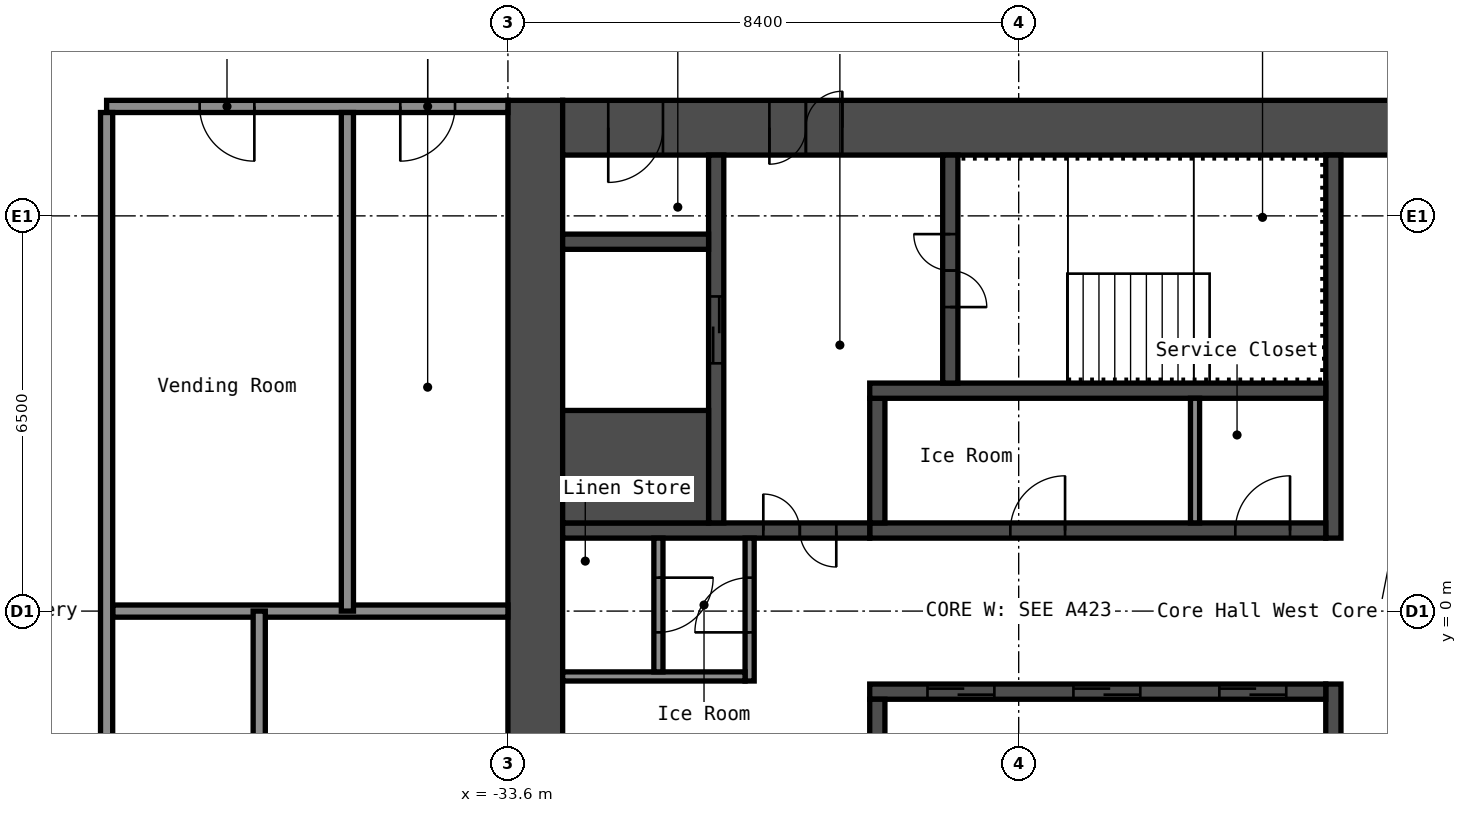
"""IFC4 building model, lengths in metres.
Left out: names, types, materials, properties, quantities, classifications, styles, units other than length and angle.
Written with IfcOpenShell. Run it as: python <this file> out.ifc"""

import sys

from ifc_helpers import new_model, si_unit, direction, frame, frame_2d, origin, place, context, subcontext, project, spatial, rectangle, extrude, element, fill, save


model = new_model("IFC4")
c1 = context("Model", 3, precision=1e-05, world=origin(), true_north=direction((0.0, 1.0)))
c2 = subcontext(c1, "Body", "Model", "MODEL_VIEW")
j1 = project(units=[si_unit("LENGTHUNIT", "METRE"), si_unit("PLANEANGLEUNIT", "RADIAN")], contexts=[c1])
p1 = place(None, origin())
s1 = spatial("IfcSite", under=j1, at=p1, CompositionType="ELEMENT")
p2 = place(p1, origin())
s2 = spatial("IfcBuilding", under=s1, at=p2, CompositionType="ELEMENT")
p3 = place(p2, frame((0.0, 0.0, 159.8)))
s3 = spatial("IfcBuildingStorey", under=s2, at=p3, CompositionType="ELEMENT", Elevation=159.8)
p4 = place(p3, frame((-33.15, -8.4, 0.0), z_axis=(0.0, 0.0, 1.0), x_axis=(0.0, 1.0, 0.0)))
e1 = element("IfcWall", 1, at=p4, inside=s3, PredefinedType="SHEAR", context=c2, shape_type="SweptSolid", body=[
    extrude(rectangle(XDim=16.8, YDim=0.9, at=frame_2d((8.4, 0.0))), origin(), (0.0, 0.0, 1.0), 2.75),
])
p5 = place(p3, frame((-32.7, 7.95, 0.0), z_axis=(0.0, 0.0, 1.0), x_axis=(1.0, 0.0, 0.0)))
e2 = element("IfcWall", 2, at=p5, inside=s3, PredefinedType="SHEAR", context=c2, shape_type="SweptSolid", body=[
    extrude(rectangle(XDim=15.0, YDim=0.9, at=frame_2d((7.5, 0.0))), origin(), (0.0, 0.0, 1.0), 2.75),
])
p6 = place(p5, frame((3.4, 0.0, 0.0)))
e3 = element("IfcOpeningElement", 3, at=p6, cuts=e2, PredefinedType="OPENING", context=c2, shape_type="SweptSolid", body=[
    extrude(rectangle(XDim=1.2, YDim=2.1, at=frame_2d((0.6, 1.05))), frame((0.0, 0.46, 0.0), z_axis=(0.0, -1.0, 0.0), x_axis=(1.0, 0.0, 0.0)), (0.0, 0.0, 1.0), 0.92),
])
p7 = place(p5, frame((0.75, 0.0, 0.0)))
e4 = element("IfcOpeningElement", 4, at=p7, cuts=e2, PredefinedType="OPENING", context=c2, shape_type="SweptSolid", body=[
    extrude(rectangle(XDim=0.9, YDim=2.1, at=frame_2d((0.45, 1.05))), frame((0.0, 0.46, 0.0), z_axis=(0.0, -1.0, 0.0), x_axis=(1.0, 0.0, 0.0)), (0.0, 0.0, 1.0), 0.92),
])
p8 = place(p3, frame((-20.025, 1.2, 0.0), z_axis=(0.0, 0.0, 1.0), x_axis=(0.0, 1.0, 0.0)))
e5 = element("IfcWall", 5, at=p8, inside=s3, PredefinedType="SHEAR", context=c2, shape_type="SweptSolid", body=[
    extrude(rectangle(XDim=6.3, YDim=0.25, at=frame_2d((3.15, 0.0))), origin(), (0.0, 0.0, 1.0), 2.75),
])
p9 = place(p3, frame((-20.025, -7.5, 0.0), z_axis=(0.0, 0.0, 1.0), x_axis=(0.0, 1.0, 0.0)))
e6 = element("IfcWall", 6, at=p9, inside=s3, PredefinedType="SHEAR", context=c2, shape_type="SweptSolid", body=[
    extrude(rectangle(XDim=6.3, YDim=0.25, at=frame_2d((3.15, 0.0))), origin(), (0.0, 0.0, 1.0), 2.75),
])
p10 = place(p9, frame((2.4, 0.0, 0.0)))
e7 = element("IfcOpeningElement", 7, at=p10, cuts=e6, PredefinedType="OPENING", context=c2, shape_type="SweptSolid", body=[
    extrude(rectangle(XDim=1.0, YDim=2.1, at=frame_2d((0.5, 1.05))), frame((0.0, 0.135, 0.0), z_axis=(0.0, -1.0, 0.0), x_axis=(1.0, 0.0, 0.0)), (0.0, 0.0, 1.0), 0.27),
])
p11 = place(p3, frame((-27.65, 1.325, 0.0), z_axis=(0.0, 0.0, 1.0), x_axis=(1.0, 0.0, 0.0)))
e8 = element("IfcWall", 8, at=p11, inside=s3, PredefinedType="SHEAR", context=c2, shape_type="SweptSolid", body=[
    extrude(rectangle(XDim=7.5, YDim=0.25, at=frame_2d((3.75, 0.0))), origin(), (0.0, 0.0, 1.0), 2.75),
])
p12 = place(p11, frame((6.012, 0.0, 0.0)))
e9 = element("IfcOpeningElement", 9, at=p12, cuts=e8, PredefinedType="OPENING", context=c2, shape_type="SweptSolid", body=[
    extrude(rectangle(XDim=0.9, YDim=2.1, at=frame_2d((0.45, 1.05))), frame((0.0, 0.135, 0.0), z_axis=(0.0, -1.0, 0.0), x_axis=(1.0, 0.0, 0.0)), (0.0, 0.0, 1.0), 0.27),
])
p13 = place(p11, frame((2.312, 0.0, 0.0)))
e10 = element("IfcOpeningElement", 10, at=p13, cuts=e8, PredefinedType="OPENING", context=c2, shape_type="SweptSolid", body=[
    extrude(rectangle(XDim=0.9, YDim=2.1, at=frame_2d((0.45, 1.05))), frame((0.0, 0.135, 0.0), z_axis=(0.0, -1.0, 0.0), x_axis=(1.0, 0.0, 0.0)), (0.0, 0.0, 1.0), 0.27),
])
p14 = place(p3, frame((-27.525, 1.45, 0.0), z_axis=(0.0, 0.0, 1.0), x_axis=(0.0, 1.0, 0.0)))
e11 = element("IfcWall", 11, at=p14, inside=s3, PredefinedType="SHEAR", context=c2, shape_type="SweptSolid", body=[
    extrude(rectangle(XDim=2.05, YDim=0.25, at=frame_2d((1.025, 0.0))), origin(), (0.0, 0.0, 1.0), 2.75),
])
p15 = place(p3, frame((-27.65, 3.625, 0.0), z_axis=(0.0, 0.0, 1.0), x_axis=(1.0, 0.0, 0.0)))
e12 = element("IfcWall", 12, at=p15, inside=s3, PredefinedType="SHEAR", context=c2, shape_type="SweptSolid", body=[
    extrude(rectangle(XDim=7.5, YDim=0.25, at=frame_2d((3.75, 0.0))), origin(), (0.0, 0.0, 1.0), 2.75),
])
p16 = place(p3, frame((-26.325, 3.75, 0.0), z_axis=(0.0, 0.0, 1.0), x_axis=(0.0, 1.0, 0.0)))
e13 = element("IfcWall", 13, at=p16, inside=s3, PredefinedType="SHEAR", context=c2, shape_type="SweptSolid", body=[
    extrude(rectangle(XDim=3.75, YDim=0.25, at=frame_2d((1.875, 0.0))), origin(), (0.0, 0.0, 1.0), 2.75),
])
p17 = place(p16, frame((1.25, 0.0, 0.0)))
e14 = element("IfcOpeningElement", 14, at=p17, cuts=e13, PredefinedType="OPENING", context=c2, shape_type="SweptSolid", body=[
    extrude(rectangle(XDim=1.2, YDim=2.1, at=frame_2d((0.6, 1.05))), frame((0.0, 0.135, 0.0), z_axis=(0.0, -1.0, 0.0), x_axis=(1.0, 0.0, 0.0)), (0.0, 0.0, 1.0), 0.27),
])
p18 = place(p3, frame((-32.7, 1.325, 0.0), z_axis=(0.0, 0.0, 1.0), x_axis=(1.0, 0.0, 0.0)))
e15 = element("IfcWall", 15, at=p18, inside=s3, PredefinedType="SHEAR", context=c2, shape_type="SweptSolid", body=[
    extrude(rectangle(XDim=5.05, YDim=0.25, at=frame_2d((2.525, 0.0))), origin(), (0.0, 0.0, 1.0), 2.75),
])
p19 = place(p18, frame((3.3, 0.0, 0.0)))
e16 = element("IfcOpeningElement", 16, at=p19, cuts=e15, PredefinedType="OPENING", context=c2, shape_type="SweptSolid", body=[
    extrude(rectangle(XDim=1.2, YDim=2.1, at=frame_2d((0.6, 1.05))), frame((0.0, 0.135, 0.0), z_axis=(0.0, -1.0, 0.0), x_axis=(1.0, 0.0, 0.0)), (0.0, 0.0, 1.0), 0.27),
])
p20 = place(p3, frame((-30.175, 1.45, 0.0), z_axis=(0.0, 0.0, 1.0), x_axis=(0.0, 1.0, 0.0)))
e17 = element("IfcWall", 17, at=p20, inside=s3, PredefinedType="SHEAR", context=c2, shape_type="SweptSolid", body=[
    extrude(rectangle(XDim=6.05, YDim=0.25, at=frame_2d((3.025, 0.0))), origin(), (0.0, 0.0, 1.0), 2.75),
])
p21 = place(p20, frame((2.625, 0.0, 0.0)))
e18 = element("IfcOpeningElement", 18, at=p21, cuts=e17, PredefinedType="OPENING", context=c2, shape_type="SweptSolid", body=[
    extrude(rectangle(XDim=1.1, YDim=2.1, at=frame_2d((0.55, 1.05))), frame((0.0, 0.135, 0.0), z_axis=(0.0, -1.0, 0.0), x_axis=(1.0, 0.0, 0.0)), (0.0, 0.0, 1.0), 0.27),
])
p22 = place(p3, frame((-32.7, 2.375, 0.0), z_axis=(0.0, 0.0, 1.0), x_axis=(1.0, 0.0, 0.0)))
e19 = element("IfcWall", 19, at=p22, inside=s3, PredefinedType="SHEAR", context=c2, shape_type="SweptSolid", body=[
    extrude(rectangle(XDim=2.4, YDim=1.85, at=frame_2d((1.2, 0.0))), origin(), (0.0, 0.0, 1.0), 2.75),
])
p23 = place(p3, frame((-32.7, 6.075, 0.0), z_axis=(0.0, 0.0, 1.0), x_axis=(1.0, 0.0, 0.0)))
e20 = element("IfcWall", 20, at=p23, inside=s3, PredefinedType="SHEAR", context=c2, shape_type="SweptSolid", body=[
    extrude(rectangle(XDim=2.4, YDim=0.25, at=frame_2d((1.2, 0.0))), origin(), (0.0, 0.0, 1.0), 2.75),
])
p24 = place(p3, frame((-27.65, -1.325, 0.0), z_axis=(0.0, 0.0, 1.0), x_axis=(1.0, 0.0, 0.0)))
e21 = element("IfcWall", 21, at=p24, inside=s3, PredefinedType="SHEAR", context=c2, shape_type="SweptSolid", body=[
    extrude(rectangle(XDim=7.5, YDim=0.25, at=frame_2d((3.75, 0.0))), origin(), (0.0, 0.0, 1.0), 2.75),
])
p25 = place(p24, frame((5.75, 0.0, 0.0)))
e22 = element("IfcOpeningElement", 22, at=p25, cuts=e21, PredefinedType="OPENING", context=c2, shape_type="SweptSolid", body=[
    extrude(rectangle(XDim=1.1, YDim=2.1, at=frame_2d((0.55, 1.05))), frame((0.0, 0.135, 0.0), z_axis=(0.0, -1.0, 0.0), x_axis=(1.0, 0.0, 0.0)), (0.0, 0.0, 1.0), 0.27),
])
p26 = place(p24, frame((3.35, 0.0, 0.0)))
e23 = element("IfcOpeningElement", 23, at=p26, cuts=e21, PredefinedType="OPENING", context=c2, shape_type="SweptSolid", body=[
    extrude(rectangle(XDim=1.1, YDim=2.1, at=frame_2d((0.55, 1.05))), frame((0.0, 0.135, 0.0), z_axis=(0.0, -1.0, 0.0), x_axis=(1.0, 0.0, 0.0)), (0.0, 0.0, 1.0), 0.27),
])
p27 = place(p24, frame((0.95, 0.0, 0.0)))
e24 = element("IfcOpeningElement", 24, at=p27, cuts=e21, PredefinedType="OPENING", context=c2, shape_type="SweptSolid", body=[
    extrude(rectangle(XDim=1.1, YDim=2.1, at=frame_2d((0.55, 1.05))), frame((0.0, 0.135, 0.0), z_axis=(0.0, -1.0, 0.0), x_axis=(1.0, 0.0, 0.0)), (0.0, 0.0, 1.0), 0.27),
])
p28 = place(p3, frame((-27.525, -3.5, 0.0), z_axis=(0.0, 0.0, 1.0), x_axis=(0.0, 1.0, 0.0)))
e25 = element("IfcWall", 25, at=p28, inside=s3, PredefinedType="SHEAR", context=c2, shape_type="SweptSolid", body=[
    extrude(rectangle(XDim=2.05, YDim=0.25, at=frame_2d((1.025, 0.0))), origin(), (0.0, 0.0, 1.0), 2.75),
])
p29 = place(p3, frame((-29.625, -1.15, 0.0), z_axis=(0.0, 0.0, 1.0), x_axis=(0.0, 1.0, 0.0)))
e26 = element("IfcWall", 26, at=p29, inside=s3, PredefinedType="PARTITIONING", context=c2, shape_type="SweptSolid", body=[
    extrude(rectangle(XDim=2.35, YDim=0.15, at=frame_2d((1.175, 0.0))), origin(), (0.0, 0.0, 1.0), 2.75),
])
p30 = place(p29, frame((0.8, 0.0, 0.0)))
e27 = element("IfcOpeningElement", 27, at=p30, cuts=e26, PredefinedType="OPENING", context=c2, shape_type="SweptSolid", body=[
    extrude(rectangle(XDim=0.9, YDim=2.1, at=frame_2d((0.45, 1.05))), frame((0.0, 0.085, 0.0), z_axis=(0.0, -1.0, 0.0), x_axis=(1.0, 0.0, 0.0)), (0.0, 0.0, 1.0), 0.17),
])
p31 = place(p3, frame((-32.7, -1.075, 0.0), z_axis=(0.0, 0.0, 1.0), x_axis=(1.0, 0.0, 0.0)))
e28 = element("IfcWall", 28, at=p31, inside=s3, PredefinedType="PARTITIONING", context=c2, shape_type="SweptSolid", body=[
    extrude(rectangle(XDim=3.0, YDim=0.15, at=frame_2d((1.5, 0.0))), origin(), (0.0, 0.0, 1.0), 2.75),
])
p32 = place(p3, frame((-31.125, -1.0, 0.0), z_axis=(0.0, 0.0, 1.0), x_axis=(0.0, 1.0, 0.0)))
e29 = element("IfcWall", 29, at=p32, inside=s3, PredefinedType="PARTITIONING", context=c2, shape_type="SweptSolid", body=[
    extrude(rectangle(XDim=2.2, YDim=0.15, at=frame_2d((1.1, 0.0))), origin(), (0.0, 0.0, 1.0), 2.75),
])
p33 = place(p32, frame((0.65, 0.0, 0.0)))
e30 = element("IfcOpeningElement", 30, at=p33, cuts=e29, PredefinedType="OPENING", context=c2, shape_type="SweptSolid", body=[
    extrude(rectangle(XDim=0.9, YDim=2.1, at=frame_2d((0.45, 1.05))), frame((0.0, 0.085, 0.0), z_axis=(0.0, -1.0, 0.0), x_axis=(1.0, 0.0, 0.0)), (0.0, 0.0, 1.0), 0.17),
])
p34 = place(p3, frame((-22.3, 1.45, 0.0), z_axis=(0.0, 0.0, 1.0), x_axis=(0.0, 1.0, 0.0)))
e31 = element("IfcWall", 31, at=p34, inside=s3, PredefinedType="PARTITIONING", context=c2, shape_type="SweptSolid", body=[
    extrude(rectangle(XDim=2.05, YDim=0.15, at=frame_2d((1.025, 0.0))), origin(), (0.0, 0.0, 1.0), 2.75),
])
p35 = place(p3, frame((-40.1, 0.0, 0.0), z_axis=(0.0, 0.0, 1.0), x_axis=(1.0, 0.0, 0.0)))
e32 = element("IfcWall", 32, at=p35, inside=s3, PredefinedType="PARTITIONING", context=c2, shape_type="SweptSolid", body=[
    extrude(rectangle(XDim=6.5, YDim=0.2, at=frame_2d((3.25, 0.0))), origin(), (0.0, 0.0, 1.0), 2.75),
])
p36 = place(p3, frame((-40.2, 8.3, 0.0), z_axis=(0.0, 0.0, 1.0), x_axis=(1.0, 0.0, 0.0)))
e33 = element("IfcWall", 33, at=p36, inside=s3, PredefinedType="PARTITIONING", context=c2, shape_type="SweptSolid", body=[
    extrude(rectangle(XDim=6.6, YDim=0.2, at=frame_2d((3.3, 0.0))), origin(), (0.0, 0.0, 1.0), 2.75),
])
p37 = place(p36, frame((1.53, 0.0, 0.0)))
e34 = element("IfcOpeningElement", 34, at=p37, cuts=e33, PredefinedType="OPENING", context=c2, shape_type="SweptSolid", body=[
    extrude(rectangle(XDim=0.9, YDim=2.1, at=frame_2d((0.45, 1.05))), frame((0.0, 0.11, 0.0), z_axis=(0.0, -1.0, 0.0), x_axis=(1.0, 0.0, 0.0)), (0.0, 0.0, 1.0), 0.22),
])
p38 = place(p36, frame((4.83, 0.0, 0.0)))
e35 = element("IfcOpeningElement", 35, at=p38, cuts=e33, PredefinedType="OPENING", context=c2, shape_type="SweptSolid", body=[
    extrude(rectangle(XDim=0.9, YDim=2.1, at=frame_2d((0.45, 1.05))), frame((0.0, 0.11, 0.0), z_axis=(0.0, -1.0, 0.0), x_axis=(1.0, 0.0, 0.0)), (0.0, 0.0, 1.0), 0.22),
])
p39 = place(p3, frame((-40.2, -8.2, 0.0), z_axis=(0.0, 0.0, 1.0), x_axis=(0.0, 1.0, 0.0)))
e36 = element("IfcWall", 36, at=p39, inside=s3, PredefinedType="PARTITIONING", context=c2, shape_type="SweptSolid", body=[
    extrude(rectangle(XDim=16.4, YDim=0.2, at=frame_2d((8.2, 0.0))), origin(), (0.0, 0.0, 1.0), 2.75),
])
for number, where, z_axis, x_axis in (
    (37, (-37.69, -8.2, 0.0), (0.0, 0.0, 1.0), (0.0, 1.0, 0.0)),
    (38, (-36.24, 0.0, 0.0), (0.0, 0.0, 1.0), (0.0, 1.0, 0.0)),
):
    element("IfcWall", number, at=place(p3, frame(where, z_axis=z_axis, x_axis=x_axis)), inside=s3, PredefinedType="PARTITIONING", context=c2, shape_type="SweptSolid", body=[
        extrude(rectangle(XDim=8.2, YDim=0.2, at=frame_2d((4.1, 0.0))), origin(), (0.0, 0.0, 1.0), 2.75),
    ])
p40 = place(p6, origin())
e39 = element("IfcDoor", 39, at=p40, inside=s3, OperationType="DOUBLE_DOOR_SINGLE_SWING", PredefinedType="DOOR", context=c2, shape_type="SweptSolid", body=[
    extrude(rectangle(XDim=1.2, YDim=2.1, at=frame_2d((0.6, 1.05))), frame((0.0, 0.025, 0.0), z_axis=(0.0, -1.0, 0.0), x_axis=(1.0, 0.0, 0.0)), (0.0, 0.0, 1.0), 0.05),
])
fill(e3, e39)
p41 = place(p7, origin())
e40 = element("IfcDoor", 40, at=p41, inside=s3, OperationType="SINGLE_SWING_LEFT", PredefinedType="DOOR", context=c2, shape_type="SweptSolid", body=[
    extrude(rectangle(XDim=0.9, YDim=2.1, at=frame_2d((0.45, 1.05))), frame((0.0, 0.025, 0.0), z_axis=(0.0, -1.0, 0.0), x_axis=(1.0, 0.0, 0.0)), (0.0, 0.0, 1.0), 0.05),
])
fill(e4, e40)
p42 = place(p17, origin())
e41 = element("IfcDoor", 41, at=p42, inside=s3, OperationType="DOUBLE_DOOR_SINGLE_SWING", PredefinedType="DOOR", context=c2, shape_type="SweptSolid", body=[
    extrude(rectangle(XDim=1.2, YDim=2.1, at=frame_2d((0.6, 1.05))), frame((0.0, 0.025, 0.0), z_axis=(0.0, -1.0, 0.0), x_axis=(1.0, 0.0, 0.0)), (0.0, 0.0, 1.0), 0.05),
])
fill(e14, e41)
p43 = place(p19, origin())
e42 = element("IfcDoor", 42, at=p43, inside=s3, OperationType="DOUBLE_DOOR_SINGLE_SWING", PredefinedType="DOOR", context=c2, shape_type="SweptSolid", body=[
    extrude(rectangle(XDim=1.2, YDim=2.1, at=frame_2d((0.6, 1.05))), frame((0.0, 0.025, 0.0), z_axis=(0.0, -1.0, 0.0), x_axis=(1.0, 0.0, 0.0)), (0.0, 0.0, 1.0), 0.05),
])
fill(e16, e42)
p44 = place(p30, origin())
e43 = element("IfcDoor", 43, at=p44, inside=s3, OperationType="SINGLE_SWING_RIGHT", PredefinedType="DOOR", context=c2, shape_type="SweptSolid", body=[
    extrude(rectangle(XDim=0.9, YDim=2.1, at=frame_2d((0.45, 1.05))), frame((0.0, 0.025, 0.0), z_axis=(0.0, -1.0, 0.0), x_axis=(1.0, 0.0, 0.0)), (0.0, 0.0, 1.0), 0.05),
])
fill(e27, e43)
p45 = place(p33, origin())
e44 = element("IfcDoor", 44, at=p45, inside=s3, OperationType="SINGLE_SWING_RIGHT", PredefinedType="DOOR", context=c2, shape_type="SweptSolid", body=[
    extrude(rectangle(XDim=0.9, YDim=2.1, at=frame_2d((0.45, 1.05))), frame((0.0, 0.025, 0.0), z_axis=(0.0, -1.0, 0.0), x_axis=(1.0, 0.0, 0.0)), (0.0, 0.0, 1.0), 0.05),
])
fill(e30, e44)
p46 = place(p12, origin())
e45 = element("IfcDoor", 45, at=p46, inside=s3, OperationType="SINGLE_SWING_LEFT", PredefinedType="DOOR", context=c2, shape_type="SweptSolid", body=[
    extrude(rectangle(XDim=0.9, YDim=2.1, at=frame_2d((0.45, 1.05))), frame((0.0, 0.025, 0.0), z_axis=(0.0, -1.0, 0.0), x_axis=(1.0, 0.0, 0.0)), (0.0, 0.0, 1.0), 0.05),
])
fill(e9, e45)
p47 = place(p13, origin())
e46 = element("IfcDoor", 46, at=p47, inside=s3, OperationType="SINGLE_SWING_LEFT", PredefinedType="DOOR", context=c2, shape_type="SweptSolid", body=[
    extrude(rectangle(XDim=0.9, YDim=2.1, at=frame_2d((0.45, 1.05))), frame((0.0, 0.025, 0.0), z_axis=(0.0, -1.0, 0.0), x_axis=(1.0, 0.0, 0.0)), (0.0, 0.0, 1.0), 0.05),
])
fill(e10, e46)
p48 = place(p25, origin())
e47 = element("IfcDoor", 47, at=p48, inside=s3, OperationType="DOUBLE_DOOR_SLIDING", PredefinedType="DOOR", context=c2, shape_type="SweptSolid", body=[
    extrude(rectangle(XDim=1.1, YDim=2.1, at=frame_2d((0.55, 1.05))), frame((0.0, 0.025, 0.0), z_axis=(0.0, -1.0, 0.0), x_axis=(1.0, 0.0, 0.0)), (0.0, 0.0, 1.0), 0.05),
])
fill(e22, e47)
p49 = place(p26, origin())
e48 = element("IfcDoor", 48, at=p49, inside=s3, OperationType="DOUBLE_DOOR_SLIDING", PredefinedType="DOOR", context=c2, shape_type="SweptSolid", body=[
    extrude(rectangle(XDim=1.1, YDim=2.1, at=frame_2d((0.55, 1.05))), frame((0.0, 0.025, 0.0), z_axis=(0.0, -1.0, 0.0), x_axis=(1.0, 0.0, 0.0)), (0.0, 0.0, 1.0), 0.05),
])
fill(e23, e48)
p50 = place(p27, origin())
e49 = element("IfcDoor", 49, at=p50, inside=s3, OperationType="DOUBLE_DOOR_SLIDING", PredefinedType="DOOR", context=c2, shape_type="SweptSolid", body=[
    extrude(rectangle(XDim=1.1, YDim=2.1, at=frame_2d((0.55, 1.05))), frame((0.0, 0.025, 0.0), z_axis=(0.0, -1.0, 0.0), x_axis=(1.0, 0.0, 0.0)), (0.0, 0.0, 1.0), 0.05),
])
fill(e24, e49)
p51 = place(p21, origin())
e50 = element("IfcDoor", 50, at=p51, inside=s3, OperationType="DOUBLE_DOOR_SLIDING", PredefinedType="DOOR", context=c2, shape_type="SweptSolid", body=[
    extrude(rectangle(XDim=1.1, YDim=2.1, at=frame_2d((0.55, 1.05))), frame((0.0, 0.025, 0.0), z_axis=(0.0, -1.0, 0.0), x_axis=(1.0, 0.0, 0.0)), (0.0, 0.0, 1.0), 0.05),
])
fill(e18, e50)
p52 = place(p37, origin())
e51 = element("IfcDoor", 51, at=p52, inside=s3, OperationType="SINGLE_SWING_RIGHT", PredefinedType="DOOR", context=c2, shape_type="SweptSolid", body=[
    extrude(rectangle(XDim=0.9, YDim=2.1, at=frame_2d((0.45, 1.05))), frame((0.0, 0.025, 0.0), z_axis=(0.0, -1.0, 0.0), x_axis=(1.0, 0.0, 0.0)), (0.0, 0.0, 1.0), 0.05),
])
fill(e34, e51)
p53 = place(p38, origin())
e52 = element("IfcDoor", 52, at=p53, inside=s3, OperationType="SINGLE_SWING_LEFT", PredefinedType="DOOR", context=c2, shape_type="SweptSolid", body=[
    extrude(rectangle(XDim=0.9, YDim=2.1, at=frame_2d((0.45, 1.05))), frame((0.0, 0.025, 0.0), z_axis=(0.0, -1.0, 0.0), x_axis=(1.0, 0.0, 0.0)), (0.0, 0.0, 1.0), 0.05),
])
fill(e35, e52)
save(model, sys.argv[1])
